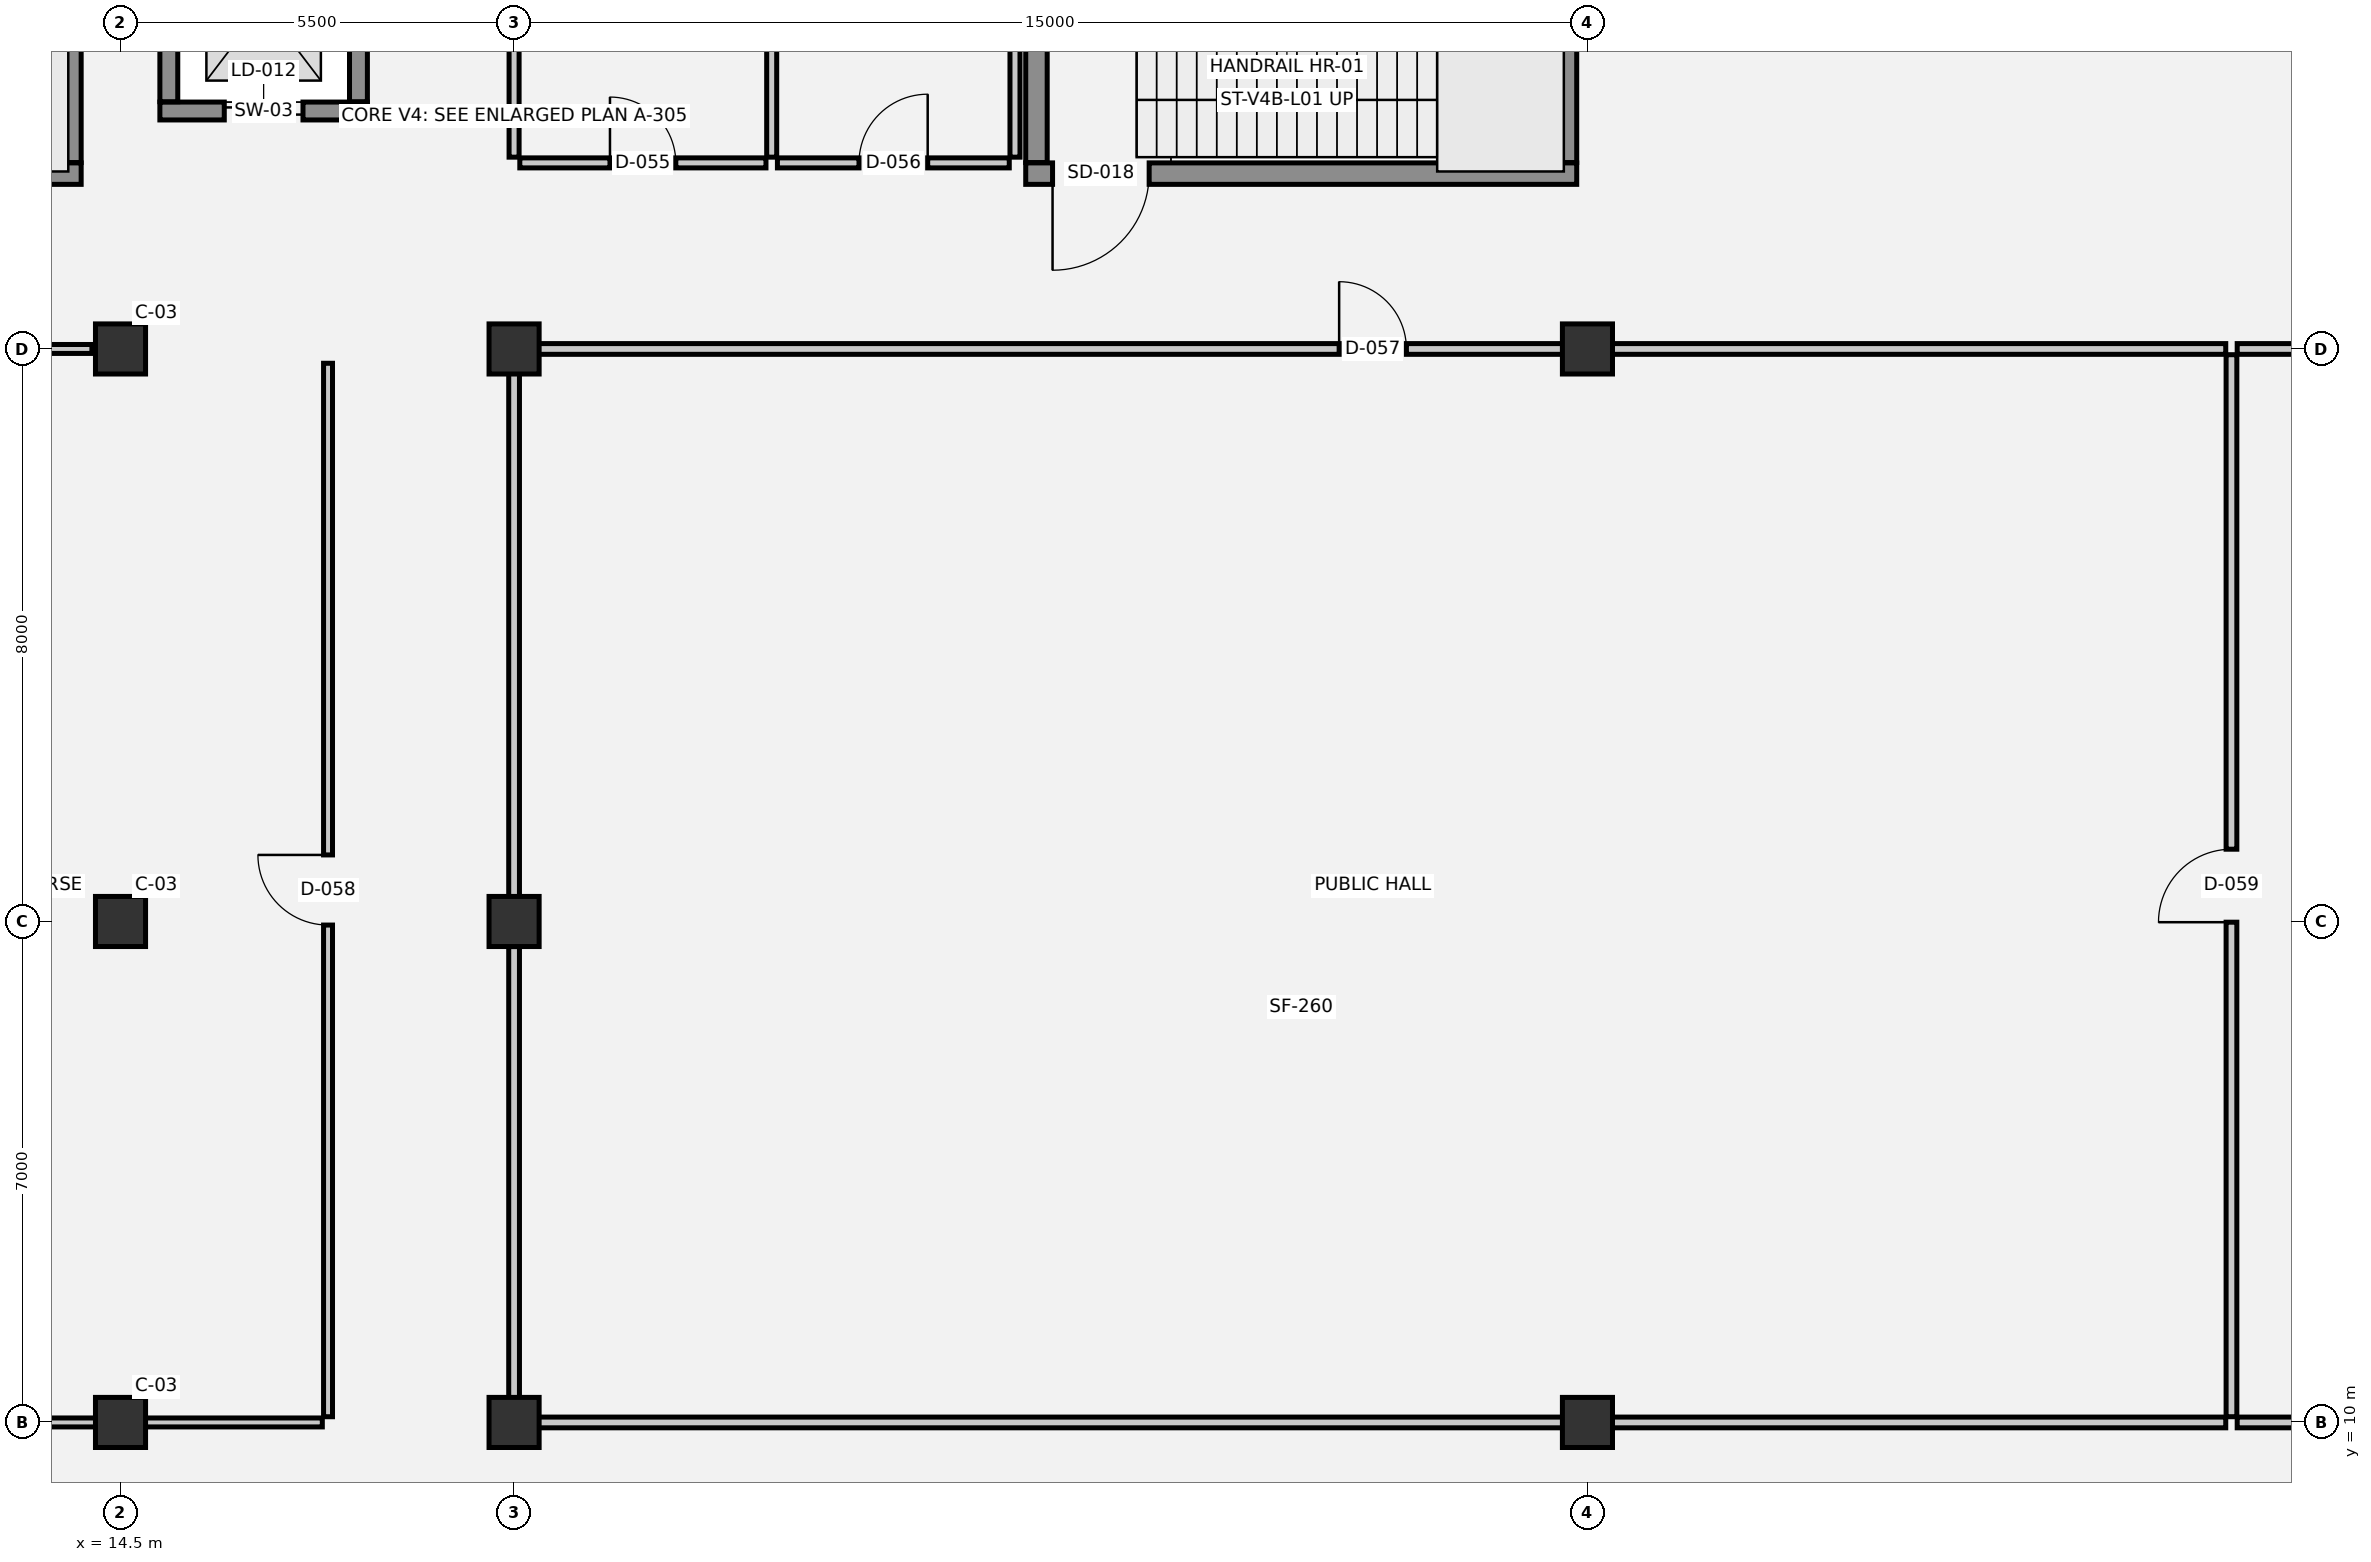
"""IFC4 building model, lengths in metres.
Left out: names, types, materials, properties, quantities, classifications, styles, units other than length and angle.
Written with IfcOpenShell. Run it as: python <this file> out.ifc"""

import sys

from ifc_helpers import new_model, si_unit, direction, frame, frame_2d, origin, origin_2d, place, context, subcontext, project, spatial, rectangle, extrude, element, fill, save


model = new_model("IFC4")
c1 = context("Model", 3, precision=1e-05, world=origin(), true_north=direction((0.0, 1.0)))
c2 = subcontext(c1, "Body", "Model", "MODEL_VIEW")
j1 = project(units=[si_unit("LENGTHUNIT", "METRE"), si_unit("PLANEANGLEUNIT", "RADIAN")], contexts=[c1])
p1 = place(None, origin())
s1 = spatial("IfcSite", under=j1, at=p1, CompositionType="ELEMENT")
p2 = place(p1, origin())
s2 = spatial("IfcBuilding", under=s1, at=p2, CompositionType="ELEMENT")
p3 = place(p2, origin())
s3 = spatial("IfcBuildingStorey", under=s2, at=p3, CompositionType="ELEMENT", Elevation=0.0)
for number, where, z_axis, x_axis in (
    (1, (14.5, 10.0, 0.0), (0.0, 0.0, 1.0), (1.0, 0.0, 0.0)),
    (2, (14.5, 17.0, 0.0), (0.0, 0.0, 1.0), (1.0, 0.0, 0.0)),
    (3, (14.5, 25.0, 0.0), (0.0, 0.0, 1.0), (1.0, 0.0, 0.0)),
    (4, (20.0, 10.0, 0.0), (0.0, 0.0, 1.0), (1.0, 0.0, 0.0)),
    (5, (20.0, 17.0, 0.0), (0.0, 0.0, 1.0), (1.0, 0.0, 0.0)),
    (6, (20.0, 25.0, 0.0), (0.0, 0.0, 1.0), (1.0, 0.0, 0.0)),
    (7, (35.0, 10.0, 0.0), (0.0, 0.0, 1.0), (1.0, 0.0, 0.0)),
    (8, (35.0, 25.0, 0.0), (0.0, 0.0, 1.0), (1.0, 0.0, 0.0)),
):
    element("IfcColumn", number, at=place(p3, frame(where, z_axis=z_axis, x_axis=x_axis)), inside=s3, PredefinedType="COLUMN", context=c2, shape_type="SweptSolid", body=[
        extrude(rectangle(XDim=0.7, YDim=0.7, at=origin_2d()), origin(), (0.0, 0.0, 1.0), 5.4),
    ])
p4 = place(p3, frame((15.05, 28.325, 0.0), z_axis=(0.0, 0.0, 1.0), x_axis=(1.0, 0.0, 0.0)))
e9 = element("IfcWall", 9, at=p4, inside=s3, PredefinedType="SHEAR", context=c2, shape_type="SweptSolid", body=[
    extrude(rectangle(XDim=2.9, YDim=0.25, at=frame_2d((1.45, 0.0))), origin(), (0.0, 0.0, 1.0), 5.4),
])
p5 = place(p4, frame((0.9, 0.0, 0.0)))
e10 = element("IfcOpeningElement", 10, at=p5, cuts=e9, PredefinedType="OPENING", context=c2, shape_type="SweptSolid", body=[
    extrude(rectangle(XDim=1.1, YDim=2.15, at=frame_2d((0.55, 1.075))), frame((0.0, 0.135, 0.0), z_axis=(0.0, -1.0, 0.0), x_axis=(1.0, 0.0, 0.0)), (0.0, 0.0, 1.0), 0.27),
])
for number, where, z_axis, x_axis in (
    (11, (15.175, 31.145, 0.0), (0.0, 0.0, 1.0), (0.0, -1.0, 0.0)),
    (12, (17.825, 28.455, 0.0), (0.0, 0.0, 1.0), (0.0, 1.0, 0.0)),
):
    element("IfcWall", number, at=place(p3, frame(where, z_axis=z_axis, x_axis=x_axis)), inside=s3, PredefinedType="SHEAR", context=c2, shape_type="SweptSolid", body=[
        extrude(rectangle(XDim=2.69, YDim=0.25, at=frame_2d((1.345, 0.0))), origin(), (0.0, 0.0, 1.0), 5.4),
    ])
p6 = place(p3, frame((13.95, 27.45, 0.0), z_axis=(0.0, 0.0, 1.0), x_axis=(-1.0, 0.0, 0.0)))
e13 = element("IfcWall", 13, at=p6, inside=s3, PredefinedType="SHEAR", context=c2, shape_type="SweptSolid", body=[
    extrude(rectangle(XDim=7.7, YDim=0.3, at=frame_2d((3.85, 0.0))), origin(), (0.0, 0.0, 1.0), 5.14),
])
p7 = place(p6, frame((5.975, 0.0, 0.0)))
e14 = element("IfcOpeningElement", 14, at=p7, cuts=e13, PredefinedType="OPENING", context=c2, shape_type="SweptSolid", body=[
    extrude(rectangle(XDim=1.35, YDim=2.2, at=frame_2d((0.675, 1.1))), frame((0.0, 0.16, 0.0), z_axis=(0.0, -1.0, 0.0), x_axis=(1.0, 0.0, 0.0)), (0.0, 0.0, 1.0), 0.32),
])
p8 = place(p3, frame((13.8, 27.605, 0.0), z_axis=(0.0, 0.0, 1.0), x_axis=(0.0, 1.0, 0.0)))
e15 = element("IfcWall", 15, at=p8, inside=s3, PredefinedType="SHEAR", context=c2, shape_type="SweptSolid", body=[
    extrude(rectangle(XDim=4.2, YDim=0.3, at=frame_2d((2.1, 0.0))), origin(), (0.0, 0.0, 1.0), 5.14),
])
p9 = place(p3, frame((34.85, 27.45, 0.0), z_axis=(0.0, 0.0, 1.0), x_axis=(-1.0, 0.0, 0.0)))
e16 = element("IfcWall", 16, at=p9, inside=s3, PredefinedType="SHEAR", context=c2, shape_type="SweptSolid", body=[
    extrude(rectangle(XDim=7.7, YDim=0.3, at=frame_2d((3.85, 0.0))), origin(), (0.0, 0.0, 1.0), 5.14),
])
p10 = place(p9, frame((5.975, 0.0, 0.0)))
e17 = element("IfcOpeningElement", 17, at=p10, cuts=e16, PredefinedType="OPENING", context=c2, shape_type="SweptSolid", body=[
    extrude(rectangle(XDim=1.35, YDim=2.2, at=frame_2d((0.675, 1.1))), frame((0.0, 0.16, 0.0), z_axis=(0.0, -1.0, 0.0), x_axis=(1.0, 0.0, 0.0)), (0.0, 0.0, 1.0), 0.32),
])
for number, where, z_axis, x_axis in (
    (18, (27.3, 31.805, 0.0), (0.0, 0.0, 1.0), (0.0, -1.0, 0.0)),
    (19, (34.7, 27.605, 0.0), (0.0, 0.0, 1.0), (0.0, 1.0, 0.0)),
):
    element("IfcWall", number, at=place(p3, frame(where, z_axis=z_axis, x_axis=x_axis)), inside=s3, PredefinedType="SHEAR", context=c2, shape_type="SweptSolid", body=[
        extrude(rectangle(XDim=4.2, YDim=0.3, at=frame_2d((2.1, 0.0))), origin(), (0.0, 0.0, 1.0), 5.14),
    ])
p11 = place(p3, frame((6.08, 10.0, 0.0), z_axis=(0.0, 0.0, 1.0), x_axis=(1.0, 0.0, 0.0)))
e20 = element("IfcWall", 20, at=p11, inside=s3, PredefinedType="PARTITIONING", context=c2, shape_type="SweptSolid", body=[
    extrude(rectangle(XDim=11.24, YDim=0.125, at=frame_2d((5.62, 0.0))), origin(), (0.0, 0.0, 1.0), 4.43),
])
p12 = place(p3, frame((20.08, 10.0, 0.0), z_axis=(0.0, 0.0, 1.0), x_axis=(1.0, 0.0, 0.0)))
e21 = element("IfcWall", 21, at=p12, inside=s3, PredefinedType="PARTITIONING", context=c2, shape_type="SweptSolid", body=[
    extrude(rectangle(XDim=23.84, YDim=0.15, at=frame_2d((11.92, 0.0))), origin(), (0.0, 0.0, 1.0), 4.18),
])
p13 = place(p3, frame((44.08, 10.0, 0.0), z_axis=(0.0, 0.0, 1.0), x_axis=(1.0, 0.0, 0.0)))
e22 = element("IfcWall", 22, at=p13, inside=s3, PredefinedType="PARTITIONING", context=c2, shape_type="SweptSolid", body=[
    extrude(rectangle(XDim=6.27, YDim=0.15, at=frame_2d((3.135, 0.0))), origin(), (0.0, 0.0, 1.0), 4.18),
])
p14 = place(p3, frame((6.08, 25.0, 0.0), z_axis=(0.0, 0.0, 1.0), x_axis=(1.0, 0.0, 0.0)))
e23 = element("IfcWall", 23, at=p14, inside=s3, PredefinedType="PARTITIONING", context=c2, shape_type="SweptSolid", body=[
    extrude(rectangle(XDim=8.02, YDim=0.125, at=frame_2d((4.01, 0.0))), origin(), (0.0, 0.0, 1.0), 4.43),
])
p15 = place(p3, frame((20.08, 25.0, 0.0), z_axis=(0.0, 0.0, 1.0), x_axis=(1.0, 0.0, 0.0)))
e24 = element("IfcWall", 24, at=p15, inside=s3, PredefinedType="PARTITIONING", context=c2, shape_type="SweptSolid", body=[
    extrude(rectangle(XDim=23.84, YDim=0.15, at=frame_2d((11.92, 0.0))), origin(), (0.0, 0.0, 1.0), 4.18),
])
p16 = place(p15, frame((11.45, 0.0, 0.0)))
e25 = element("IfcOpeningElement", 25, at=p16, cuts=e24, PredefinedType="OPENING", context=c2, shape_type="SweptSolid", body=[
    extrude(rectangle(XDim=0.94, YDim=2.15, at=frame_2d((0.47, 1.075))), frame((0.0, 0.085, 0.0), z_axis=(0.0, -1.0, 0.0), x_axis=(1.0, 0.0, 0.0)), (0.0, 0.0, 1.0), 0.17),
])
p17 = place(p3, frame((44.08, 25.0, 0.0), z_axis=(0.0, 0.0, 1.0), x_axis=(1.0, 0.0, 0.0)))
e26 = element("IfcWall", 26, at=p17, inside=s3, PredefinedType="PARTITIONING", context=c2, shape_type="SweptSolid", body=[
    extrude(rectangle(XDim=6.27, YDim=0.15, at=frame_2d((3.135, 0.0))), origin(), (0.0, 0.0, 1.0), 4.18),
])
p18 = place(p3, frame((20.08, 27.6, 0.0), z_axis=(0.0, 0.0, 1.0), x_axis=(1.0, 0.0, 0.0)))
e27 = element("IfcWall", 27, at=p18, inside=s3, PredefinedType="PLUMBINGWALL", context=c2, shape_type="SweptSolid", body=[
    extrude(rectangle(XDim=3.44, YDim=0.14, at=frame_2d((1.72, 0.0))), origin(), (0.0, 0.0, 1.0), 5.04),
])
p19 = place(p18, frame((1.26, 0.0, 0.0)))
e28 = element("IfcOpeningElement", 28, at=p19, cuts=e27, PredefinedType="OPENING", context=c2, shape_type="SweptSolid", body=[
    extrude(rectangle(XDim=0.92, YDim=2.1, at=frame_2d((0.46, 1.05))), frame((0.0, 0.08, 0.0), z_axis=(0.0, -1.0, 0.0), x_axis=(1.0, 0.0, 0.0)), (0.0, 0.0, 1.0), 0.16),
])
p20 = place(p3, frame((23.68, 27.6, 0.0), z_axis=(0.0, 0.0, 1.0), x_axis=(1.0, 0.0, 0.0)))
e29 = element("IfcWall", 29, at=p20, inside=s3, PredefinedType="PLUMBINGWALL", context=c2, shape_type="SweptSolid", body=[
    extrude(rectangle(XDim=3.24, YDim=0.14, at=frame_2d((1.62, 0.0))), origin(), (0.0, 0.0, 1.0), 5.04),
])
p21 = place(p20, frame((1.14, 0.0, 0.0)))
e30 = element("IfcOpeningElement", 30, at=p21, cuts=e29, PredefinedType="OPENING", context=c2, shape_type="SweptSolid", body=[
    extrude(rectangle(XDim=0.96, YDim=2.1, at=frame_2d((0.48, 1.05))), frame((0.0, 0.08, 0.0), z_axis=(0.0, -1.0, 0.0), x_axis=(1.0, 0.0, 0.0)), (0.0, 0.0, 1.0), 0.16),
])
p22 = place(p3, frame((17.4, 10.08, 0.0), z_axis=(0.0, 0.0, 1.0), x_axis=(0.0, 1.0, 0.0)))
e31 = element("IfcWall", 31, at=p22, inside=s3, PredefinedType="PARTITIONING", context=c2, shape_type="SweptSolid", body=[
    extrude(rectangle(XDim=14.72, YDim=0.125, at=frame_2d((7.36, 0.0))), origin(), (0.0, 0.0, 1.0), 5.04),
])
p23 = place(p22, frame((6.87, 0.0, 0.0)))
e32 = element("IfcOpeningElement", 32, at=p23, cuts=e31, PredefinedType="OPENING", context=c2, shape_type="SweptSolid", body=[
    extrude(rectangle(XDim=0.98, YDim=2.1, at=frame_2d((0.49, 1.05))), frame((0.0, 0.073, 0.0), z_axis=(0.0, -1.0, 0.0), x_axis=(1.0, 0.0, 0.0)), (0.0, 0.0, 1.0), 0.145),
])
p24 = place(p3, frame((20.0, 10.08, 0.0), z_axis=(0.0, 0.0, 1.0), x_axis=(0.0, 1.0, 0.0)))
e33 = element("IfcWall", 33, at=p24, inside=s3, PredefinedType="PARTITIONING", context=c2, shape_type="SweptSolid", body=[
    extrude(rectangle(XDim=6.57, YDim=0.15, at=frame_2d((3.285, 0.0))), origin(), (0.0, 0.0, 1.0), 4.58),
])
p25 = place(p3, frame((20.0, 16.65, 0.0), z_axis=(0.0, 0.0, 1.0), x_axis=(0.0, 1.0, 0.0)))
e34 = element("IfcWall", 34, at=p25, inside=s3, PredefinedType="PARTITIONING", context=c2, shape_type="SweptSolid", body=[
    extrude(rectangle(XDim=8.27, YDim=0.15, at=frame_2d((4.135, 0.0))), origin(), (0.0, 0.0, 1.0), 4.43),
])
p26 = place(p3, frame((20.0, 27.68, 0.0), z_axis=(0.0, 0.0, 1.0), x_axis=(0.0, 1.0, 0.0)))
e35 = element("IfcWall", 35, at=p26, inside=s3, PredefinedType="PLUMBINGWALL", context=c2, shape_type="SweptSolid", body=[
    extrude(rectangle(XDim=4.24, YDim=0.14, at=frame_2d((2.12, 0.0))), origin(), (0.0, 0.0, 1.0), 4.58),
])
for number, where, z_axis, x_axis in (
    (36, (23.6, 27.68, 0.0), (0.0, 0.0, 1.0), (0.0, 1.0, 0.0)),
    (37, (27.0, 27.68, 0.0), (0.0, 0.0, 1.0), (0.0, 1.0, 0.0)),
):
    element("IfcWall", number, at=place(p3, frame(where, z_axis=z_axis, x_axis=x_axis)), inside=s3, PredefinedType="PLUMBINGWALL", context=c2, shape_type="SweptSolid", body=[
        extrude(rectangle(XDim=4.24, YDim=0.14, at=frame_2d((2.12, 0.0))), origin(), (0.0, 0.0, 1.0), 5.04),
    ])
p27 = place(p3, frame((44.0, 10.08, 0.0), z_axis=(0.0, 0.0, 1.0), x_axis=(0.0, 1.0, 0.0)))
e38 = element("IfcWall", 38, at=p27, inside=s3, PredefinedType="PARTITIONING", context=c2, shape_type="SweptSolid", body=[
    extrude(rectangle(XDim=14.84, YDim=0.15, at=frame_2d((7.42, 0.0))), origin(), (0.0, 0.0, 1.0), 5.04),
])
p28 = place(p27, frame((6.91, 0.0, 0.0)))
e39 = element("IfcOpeningElement", 39, at=p28, cuts=e38, PredefinedType="OPENING", context=c2, shape_type="SweptSolid", body=[
    extrude(rectangle(XDim=1.02, YDim=2.15, at=frame_2d((0.51, 1.075))), frame((0.0, 0.085, 0.0), z_axis=(0.0, -1.0, 0.0), x_axis=(1.0, 0.0, 0.0)), (0.0, 0.0, 1.0), 0.17),
])
p29 = place(p5, origin())
e40 = element("IfcDoor", 40, at=p29, inside=s3, OperationType="DOUBLE_DOOR_SLIDING", PredefinedType="DOOR", context=c2, shape_type="SweptSolid", body=[
    extrude(rectangle(XDim=1.1, YDim=2.15, at=frame_2d((0.55, 1.075))), frame((0.0, 0.025, 0.0), z_axis=(0.0, -1.0, 0.0), x_axis=(1.0, 0.0, 0.0)), (0.0, 0.0, 1.0), 0.05),
])
fill(e10, e40)
p30 = place(p10, origin())
e41 = element("IfcDoor", 41, at=p30, inside=s3, OperationType="SINGLE_SWING_RIGHT", PredefinedType="DOOR", context=c2, shape_type="SweptSolid", body=[
    extrude(rectangle(XDim=1.35, YDim=2.2, at=frame_2d((0.675, 1.1))), frame((0.0, 0.025, 0.0), z_axis=(0.0, -1.0, 0.0), x_axis=(1.0, 0.0, 0.0)), (0.0, 0.0, 1.0), 0.05),
])
fill(e17, e41)
p31 = place(p19, origin())
e42 = element("IfcDoor", 42, at=p31, inside=s3, OperationType="SINGLE_SWING_LEFT", PredefinedType="DOOR", context=c2, shape_type="SweptSolid", body=[
    extrude(rectangle(XDim=0.92, YDim=2.1, at=frame_2d((0.46, 1.05))), frame((0.0, 0.025, 0.0), z_axis=(0.0, -1.0, 0.0), x_axis=(1.0, 0.0, 0.0)), (0.0, 0.0, 1.0), 0.05),
])
fill(e28, e42)
p32 = place(p21, origin())
e43 = element("IfcDoor", 43, at=p32, inside=s3, OperationType="SINGLE_SWING_RIGHT", PredefinedType="DOOR", context=c2, shape_type="SweptSolid", body=[
    extrude(rectangle(XDim=0.96, YDim=2.1, at=frame_2d((0.48, 1.05))), frame((0.0, 0.025, 0.0), z_axis=(0.0, -1.0, 0.0), x_axis=(1.0, 0.0, 0.0)), (0.0, 0.0, 1.0), 0.05),
])
fill(e30, e43)
p33 = place(p16, origin())
e44 = element("IfcDoor", 44, at=p33, inside=s3, OperationType="SINGLE_SWING_LEFT", PredefinedType="DOOR", context=c2, shape_type="SweptSolid", body=[
    extrude(rectangle(XDim=0.94, YDim=2.15, at=frame_2d((0.47, 1.075))), frame((0.0, 0.025, 0.0), z_axis=(0.0, -1.0, 0.0), x_axis=(1.0, 0.0, 0.0)), (0.0, 0.0, 1.0), 0.05),
])
fill(e25, e44)
p34 = place(p23, origin())
e45 = element("IfcDoor", 45, at=p34, inside=s3, OperationType="SINGLE_SWING_RIGHT", PredefinedType="DOOR", context=c2, shape_type="SweptSolid", body=[
    extrude(rectangle(XDim=0.98, YDim=2.1, at=frame_2d((0.49, 1.05))), frame((0.0, 0.025, 0.0), z_axis=(0.0, -1.0, 0.0), x_axis=(1.0, 0.0, 0.0)), (0.0, 0.0, 1.0), 0.05),
])
fill(e32, e45)
p35 = place(p28, origin())
e46 = element("IfcDoor", 46, at=p35, inside=s3, OperationType="SINGLE_SWING_LEFT", PredefinedType="DOOR", context=c2, shape_type="SweptSolid", body=[
    extrude(rectangle(XDim=1.02, YDim=2.15, at=frame_2d((0.51, 1.075))), frame((0.0, 0.025, 0.0), z_axis=(0.0, -1.0, 0.0), x_axis=(1.0, 0.0, 0.0)), (0.0, 0.0, 1.0), 0.05),
])
fill(e39, e46)
save(model, sys.argv[1])
